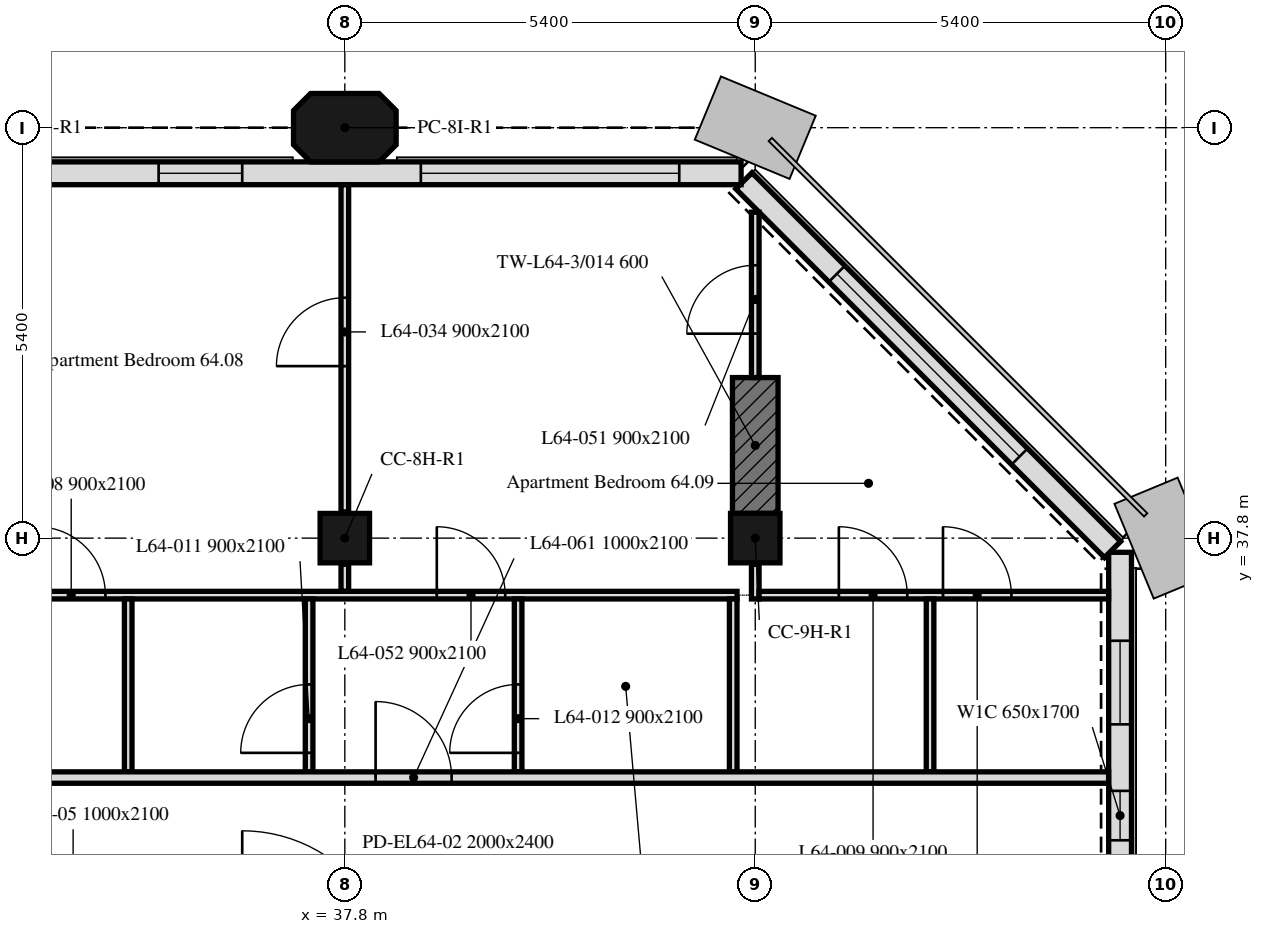
"""IFC4 building model, lengths in metres.
Left out: names, types, materials, properties, quantities, classifications, styles, units other than length and angle.
Written with IfcOpenShell. Run it as: python <this file> out.ifc"""

import sys

from ifc_helpers import new_model, si_unit, direction, frame, frame_2d, origin, origin_2d, place, context, subcontext, project, spatial, polyline, rectangle, outline, extrude, element, fill, save


model = new_model("IFC4")
c1 = context("Model", 3, precision=1e-05, world=origin(), true_north=direction((0.0, 1.0)))
c2 = subcontext(c1, "Body", "Model", "MODEL_VIEW")
j1 = project(units=[si_unit("LENGTHUNIT", "METRE"), si_unit("PLANEANGLEUNIT", "RADIAN")], contexts=[c1])
p1 = place(None, origin())
s1 = spatial("IfcSite", under=j1, at=p1, CompositionType="ELEMENT")
p2 = place(p1, origin())
s2 = spatial("IfcBuilding", under=s1, at=p2, CompositionType="ELEMENT")
p3 = place(p2, frame((0.0, 0.0, 265.3)))
s3 = spatial("IfcBuildingStorey", under=s2, at=p3, CompositionType="ELEMENT", Elevation=265.3)
for number, where, z_axis, x_axis in (
    (1, (37.8, 37.8, 0.0), (0.0, 0.0, 1.0), (1.0, 0.0, 0.0)),
    (2, (43.2, 37.8, 0.0), (0.0, 0.0, 1.0), (1.0, 0.0, 0.0)),
):
    element("IfcColumn", number, at=place(p3, frame(where, z_axis=z_axis, x_axis=x_axis)), inside=s3, PredefinedType="COLUMN", context=c2, shape_type="SweptSolid", body=[
        extrude(rectangle(XDim=0.65, YDim=0.65, at=origin_2d()), origin(), (0.0, 0.0, 1.0), 3.0),
    ])
p4 = place(p3, frame((37.8, 43.2, 0.0), z_axis=(0.0, 0.0, 1.0), x_axis=(1.0, 0.0, 0.0)))
e3 = element("IfcColumn", 3, at=p4, inside=s3, PredefinedType="COLUMN", context=c2, shape_type="SweptSolid", body=[
    extrude(outline(polyline([(-0.45, -0.45), (0.45, -0.45), (0.675, -0.225), (0.675, 0.225), (0.45, 0.45), (-0.45, 0.45), (-0.675, 0.225), (-0.675, -0.225), (-0.45, -0.45)])), origin(), (0.0, 0.0, 1.0), 3.0),
])
p5 = place(p3, frame((43.2, 38.125, 0.0), z_axis=(0.0, 0.0, 1.0), x_axis=(0.0, 1.0, 0.0)))
e4 = element("IfcWall", 4, at=p5, inside=s3, PredefinedType="SHEAR", context=c2, shape_type="SweptSolid", body=[
    extrude(rectangle(XDim=1.788, YDim=0.6, at=frame_2d((0.894, 0.0))), origin(), (0.0, 0.0, 1.0), 3.0),
])
p6 = place(p3, frame((48.0, 5.586, 0.0), z_axis=(0.0, 0.0, 1.0), x_axis=(0.0, 1.0, 0.0)))
e5 = element("IfcWall", 5, at=p6, inside=s3, PredefinedType="SOLIDWALL", context=c2, shape_type="SweptSolid", body=[
    extrude(rectangle(XDim=32.027, YDim=0.3, at=frame_2d((16.014, 0.0))), origin(), (0.0, 0.0, 1.0), 3.0),
])
p7 = place(p6, frame((1.314, 0.0, 0.9)))
e6 = element("IfcOpeningElement", 6, at=p7, cuts=e5, PredefinedType="OPENING", context=c2, shape_type="SweptSolid", body=[
    extrude(rectangle(XDim=1.1, YDim=1.7, at=frame_2d((0.55, 0.85))), frame((0.0, 0.16, 0.0), z_axis=(0.0, -1.0, 0.0), x_axis=(1.0, 0.0, 0.0)), (0.0, 0.0, 1.0), 0.32),
])
p8 = place(p6, frame((2.764, 0.0, 0.9)))
e7 = element("IfcOpeningElement", 7, at=p8, cuts=e5, PredefinedType="OPENING", context=c2, shape_type="SweptSolid", body=[
    extrude(rectangle(XDim=1.1, YDim=1.7, at=frame_2d((0.55, 0.85))), frame((0.0, 0.16, 0.0), z_axis=(0.0, -1.0, 0.0), x_axis=(1.0, 0.0, 0.0)), (0.0, 0.0, 1.0), 0.32),
])
p9 = place(p6, frame((7.664, 0.0, 0.9)))
e8 = element("IfcOpeningElement", 8, at=p9, cuts=e5, PredefinedType="OPENING", context=c2, shape_type="SweptSolid", body=[
    extrude(rectangle(XDim=0.5, YDim=1.7, at=frame_2d((0.25, 0.85))), frame((0.0, 0.16, 0.0), z_axis=(0.0, -1.0, 0.0), x_axis=(1.0, 0.0, 0.0)), (0.0, 0.0, 1.0), 0.32),
])
p10 = place(p6, frame((13.064, 0.0, 0.9)))
e9 = element("IfcOpeningElement", 9, at=p10, cuts=e5, PredefinedType="OPENING", context=c2, shape_type="SweptSolid", body=[
    extrude(rectangle(XDim=0.5, YDim=1.7, at=frame_2d((0.25, 0.85))), frame((0.0, 0.16, 0.0), z_axis=(0.0, -1.0, 0.0), x_axis=(1.0, 0.0, 0.0)), (0.0, 0.0, 1.0), 0.32),
])
p11 = place(p6, frame((18.464, 0.0, 0.9)))
e10 = element("IfcOpeningElement", 10, at=p11, cuts=e5, PredefinedType="OPENING", context=c2, shape_type="SweptSolid", body=[
    extrude(rectangle(XDim=0.5, YDim=1.7, at=frame_2d((0.25, 0.85))), frame((0.0, 0.16, 0.0), z_axis=(0.0, -1.0, 0.0), x_axis=(1.0, 0.0, 0.0)), (0.0, 0.0, 1.0), 0.32),
])
p12 = place(p6, frame((23.864, 0.0, 0.9)))
e11 = element("IfcOpeningElement", 11, at=p12, cuts=e5, PredefinedType="OPENING", context=c2, shape_type="SweptSolid", body=[
    extrude(rectangle(XDim=0.5, YDim=1.7, at=frame_2d((0.25, 0.85))), frame((0.0, 0.16, 0.0), z_axis=(0.0, -1.0, 0.0), x_axis=(1.0, 0.0, 0.0)), (0.0, 0.0, 1.0), 0.32),
])
p13 = place(p6, frame((28.239, 0.0, 0.9)))
e12 = element("IfcOpeningElement", 12, at=p13, cuts=e5, PredefinedType="OPENING", context=c2, shape_type="SweptSolid", body=[
    extrude(rectangle(XDim=0.65, YDim=1.7, at=frame_2d((0.325, 0.85))), frame((0.0, 0.16, 0.0), z_axis=(0.0, -1.0, 0.0), x_axis=(1.0, 0.0, 0.0)), (0.0, 0.0, 1.0), 0.32),
])
p14 = place(p6, frame((29.764, 0.0, 0.9)))
e13 = element("IfcOpeningElement", 13, at=p14, cuts=e5, PredefinedType="OPENING", context=c2, shape_type="SweptSolid", body=[
    extrude(rectangle(XDim=1.1, YDim=1.7, at=frame_2d((0.55, 0.85))), frame((0.0, 0.16, 0.0), z_axis=(0.0, -1.0, 0.0), x_axis=(1.0, 0.0, 0.0)), (0.0, 0.0, 1.0), 0.32),
])
p15 = place(p3, frame((47.901, 37.65, 0.0), z_axis=(0.0, 0.0, 1.0), x_axis=(-0.707106781187, 0.707106781187, 0.0)))
e14 = element("IfcWall", 14, at=p15, inside=s3, PredefinedType="SOLIDWALL", context=c2, shape_type="SweptSolid", body=[
    extrude(rectangle(XDim=6.86, YDim=0.3, at=frame_2d((3.43, 0.0))), origin(), (0.0, 0.0, 1.0), 3.0),
])
p16 = place(p15, frame((1.73, 0.0, 0.9)))
e15 = element("IfcOpeningElement", 15, at=p16, cuts=e14, PredefinedType="OPENING", context=c2, shape_type="SweptSolid", body=[
    extrude(rectangle(XDim=3.4, YDim=1.7, at=frame_2d((1.7, 0.85))), frame((0.0, 0.16, 0.0), z_axis=(0.0, -1.0, 0.0), x_axis=(1.0, 0.0, 0.0)), (0.0, 0.0, 1.0), 0.32),
])
p17 = place(p3, frame((43.014, 42.6, 0.0), z_axis=(0.0, 0.0, 1.0), x_axis=(-1.0, 0.0, 0.0)))
e16 = element("IfcWall", 16, at=p17, inside=s3, PredefinedType="SOLIDWALL", context=c2, shape_type="SweptSolid", body=[
    extrude(rectangle(XDim=32.027, YDim=0.3, at=frame_2d((16.014, 0.0))), origin(), (0.0, 0.0, 1.0), 3.0),
])
p18 = place(p17, frame((0.814, 0.0, 0.9)))
e17 = element("IfcOpeningElement", 17, at=p18, cuts=e16, PredefinedType="OPENING", context=c2, shape_type="SweptSolid", body=[
    extrude(rectangle(XDim=3.4, YDim=1.7, at=frame_2d((1.7, 0.85))), frame((0.0, 0.16, 0.0), z_axis=(0.0, -1.0, 0.0), x_axis=(1.0, 0.0, 0.0)), (0.0, 0.0, 1.0), 0.32),
])
p19 = place(p17, frame((6.564, 0.0, 0.9)))
e18 = element("IfcOpeningElement", 18, at=p19, cuts=e16, PredefinedType="OPENING", context=c2, shape_type="SweptSolid", body=[
    extrude(rectangle(XDim=1.1, YDim=1.7, at=frame_2d((0.55, 0.85))), frame((0.0, 0.16, 0.0), z_axis=(0.0, -1.0, 0.0), x_axis=(1.0, 0.0, 0.0)), (0.0, 0.0, 1.0), 0.32),
])
p20 = place(p17, frame((11.614, 0.0, 0.9)))
e19 = element("IfcOpeningElement", 19, at=p20, cuts=e16, PredefinedType="OPENING", context=c2, shape_type="SweptSolid", body=[
    extrude(rectangle(XDim=3.4, YDim=1.7, at=frame_2d((1.7, 0.85))), frame((0.0, 0.16, 0.0), z_axis=(0.0, -1.0, 0.0), x_axis=(1.0, 0.0, 0.0)), (0.0, 0.0, 1.0), 0.32),
])
p21 = place(p17, frame((17.364, 0.0, 0.9)))
e20 = element("IfcOpeningElement", 20, at=p21, cuts=e16, PredefinedType="OPENING", context=c2, shape_type="SweptSolid", body=[
    extrude(rectangle(XDim=1.1, YDim=1.7, at=frame_2d((0.55, 0.85))), frame((0.0, 0.16, 0.0), z_axis=(0.0, -1.0, 0.0), x_axis=(1.0, 0.0, 0.0)), (0.0, 0.0, 1.0), 0.32),
])
p22 = place(p17, frame((22.414, 0.0, 0.9)))
e21 = element("IfcOpeningElement", 21, at=p22, cuts=e16, PredefinedType="OPENING", context=c2, shape_type="SweptSolid", body=[
    extrude(rectangle(XDim=3.4, YDim=1.7, at=frame_2d((1.7, 0.85))), frame((0.0, 0.16, 0.0), z_axis=(0.0, -1.0, 0.0), x_axis=(1.0, 0.0, 0.0)), (0.0, 0.0, 1.0), 0.32),
])
p23 = place(p17, frame((28.164, 0.0, 0.9)))
e22 = element("IfcOpeningElement", 22, at=p23, cuts=e16, PredefinedType="OPENING", context=c2, shape_type="SweptSolid", body=[
    extrude(rectangle(XDim=1.1, YDim=1.7, at=frame_2d((0.55, 0.85))), frame((0.0, 0.16, 0.0), z_axis=(0.0, -1.0, 0.0), x_axis=(1.0, 0.0, 0.0)), (0.0, 0.0, 1.0), 0.32),
])
p24 = place(p3, frame((37.8, 37.1, 0.0), z_axis=(0.0, 0.0, 1.0), x_axis=(0.0, 1.0, 0.0)))
e23 = element("IfcWall", 23, at=p24, inside=s3, PredefinedType="PARTITIONING", context=c2, shape_type="SweptSolid", body=[
    extrude(rectangle(XDim=0.355, YDim=0.1, at=frame_2d((0.177, 0.0))), origin(), (0.0, 0.0, 1.0), 3.0),
])
p25 = place(p3, frame((37.8, 38.145, 0.0), z_axis=(0.0, 0.0, 1.0), x_axis=(0.0, 1.0, 0.0)))
e24 = element("IfcWall", 24, at=p25, inside=s3, PredefinedType="PARTITIONING", context=c2, shape_type="SweptSolid", body=[
    extrude(rectangle(XDim=4.304, YDim=0.1, at=frame_2d((2.152, 0.0))), origin(), (0.0, 0.0, 1.0), 3.0),
])
p26 = place(p25, frame((1.918, 0.0, 0.0)))
e25 = element("IfcOpeningElement", 25, at=p26, cuts=e24, PredefinedType="OPENING", context=c2, shape_type="SweptSolid", body=[
    extrude(rectangle(XDim=0.9, YDim=2.1, at=frame_2d((0.45, 1.05))), frame((0.0, 0.05, 0.0), z_axis=(0.0, -1.0, 0.0), x_axis=(1.0, 0.0, 0.0)), (0.0, 0.0, 1.0), 0.1),
])
p27 = place(p3, frame((32.475, 37.05, 0.0), z_axis=(0.0, 0.0, 1.0), x_axis=(1.0, 0.0, 0.0)))
e26 = element("IfcWall", 26, at=p27, inside=s3, PredefinedType="PARTITIONING", context=c2, shape_type="SweptSolid", body=[
    extrude(rectangle(XDim=10.485, YDim=0.1, at=frame_2d((5.242, 0.0))), origin(), (0.0, 0.0, 1.0), 3.0),
])
p28 = place(p27, frame((1.275, 0.0, 0.0)))
e27 = element("IfcOpeningElement", 27, at=p28, cuts=e26, PredefinedType="OPENING", context=c2, shape_type="SweptSolid", body=[
    extrude(rectangle(XDim=0.9, YDim=2.1, at=frame_2d((0.45, 1.05))), frame((0.0, 0.05, 0.0), z_axis=(0.0, -1.0, 0.0), x_axis=(1.0, 0.0, 0.0)), (0.0, 0.0, 1.0), 0.1),
])
p29 = place(p27, frame((6.535, 0.0, 0.0)))
e28 = element("IfcOpeningElement", 28, at=p29, cuts=e26, PredefinedType="OPENING", context=c2, shape_type="SweptSolid", body=[
    extrude(rectangle(XDim=0.9, YDim=2.1, at=frame_2d((0.45, 1.05))), frame((0.0, 0.05, 0.0), z_axis=(0.0, -1.0, 0.0), x_axis=(1.0, 0.0, 0.0)), (0.0, 0.0, 1.0), 0.1),
])
p30 = place(p3, frame((43.2, 37.0, 0.0), z_axis=(0.0, 0.0, 1.0), x_axis=(0.0, 1.0, 0.0)))
e29 = element("IfcWall", 29, at=p30, inside=s3, PredefinedType="PARTITIONING", context=c2, shape_type="SweptSolid", body=[
    extrude(rectangle(XDim=0.455, YDim=0.1, at=frame_2d((0.228, 0.0))), origin(), (0.0, 0.0, 1.0), 3.0),
])
p31 = place(p3, frame((43.2, 39.913, 0.0), z_axis=(0.0, 0.0, 1.0), x_axis=(0.0, 1.0, 0.0)))
e30 = element("IfcWall", 30, at=p31, inside=s3, PredefinedType="PARTITIONING", context=c2, shape_type="SweptSolid", body=[
    extrude(rectangle(XDim=2.175, YDim=0.1, at=frame_2d((1.088, 0.0))), origin(), (0.0, 0.0, 1.0), 3.0),
])
p32 = place(p31, frame((0.577, 0.0, 0.0)))
e31 = element("IfcOpeningElement", 31, at=p32, cuts=e30, PredefinedType="OPENING", context=c2, shape_type="SweptSolid", body=[
    extrude(rectangle(XDim=0.9, YDim=2.1, at=frame_2d((0.45, 1.05))), frame((0.0, 0.05, 0.0), z_axis=(0.0, -1.0, 0.0), x_axis=(1.0, 0.0, 0.0)), (0.0, 0.0, 1.0), 0.1),
])
p33 = place(p3, frame((43.25, 37.05, 0.0), z_axis=(0.0, 0.0, 1.0), x_axis=(1.0, 0.0, 0.0)))
e32 = element("IfcWall", 32, at=p33, inside=s3, PredefinedType="PARTITIONING", context=c2, shape_type="SweptSolid", body=[
    extrude(rectangle(XDim=4.599, YDim=0.1, at=frame_2d((2.3, 0.0))), origin(), (0.0, 0.0, 1.0), 3.0),
])
p34 = place(p33, frame((1.05, 0.0, 0.0)))
e33 = element("IfcOpeningElement", 33, at=p34, cuts=e32, PredefinedType="OPENING", context=c2, shape_type="SweptSolid", body=[
    extrude(rectangle(XDim=0.9, YDim=2.1, at=frame_2d((0.45, 1.05))), frame((0.0, 0.05, 0.0), z_axis=(0.0, -1.0, 0.0), x_axis=(1.0, 0.0, 0.0)), (0.0, 0.0, 1.0), 0.1),
])
p35 = place(p33, frame((2.42, 0.0, 0.0)))
e34 = element("IfcOpeningElement", 34, at=p35, cuts=e32, PredefinedType="OPENING", context=c2, shape_type="SweptSolid", body=[
    extrude(rectangle(XDim=0.9, YDim=2.1, at=frame_2d((0.45, 1.05))), frame((0.0, 0.05, 0.0), z_axis=(0.0, -1.0, 0.0), x_axis=(1.0, 0.0, 0.0)), (0.0, 0.0, 1.0), 0.1),
])
p36 = place(p3, frame((34.95, 34.725, 0.0), z_axis=(0.0, 0.0, 1.0), x_axis=(0.0, 1.0, 0.0)))
e35 = element("IfcWall", 35, at=p36, inside=s3, PredefinedType="PARTITIONING", context=c2, shape_type="SweptSolid", body=[
    extrude(rectangle(XDim=2.275, YDim=0.1, at=frame_2d((1.137, 0.0))), origin(), (0.0, 0.0, 1.0), 3.0),
])
p37 = place(p3, frame((37.33, 34.725, 0.0), z_axis=(0.0, 0.0, 1.0), x_axis=(0.0, 1.0, 0.0)))
e36 = element("IfcWall", 36, at=p37, inside=s3, PredefinedType="PARTITIONING", context=c2, shape_type="SweptSolid", body=[
    extrude(rectangle(XDim=2.275, YDim=0.1, at=frame_2d((1.137, 0.0))), origin(), (0.0, 0.0, 1.0), 3.0),
])
p38 = place(p37, frame((0.25, 0.0, 0.0)))
e37 = element("IfcOpeningElement", 37, at=p38, cuts=e36, PredefinedType="OPENING", context=c2, shape_type="SweptSolid", body=[
    extrude(rectangle(XDim=0.9, YDim=2.1, at=frame_2d((0.45, 1.05))), frame((0.0, 0.05, 0.0), z_axis=(0.0, -1.0, 0.0), x_axis=(1.0, 0.0, 0.0)), (0.0, 0.0, 1.0), 0.1),
])
p39 = place(p3, frame((40.08, 34.725, 0.0), z_axis=(0.0, 0.0, 1.0), x_axis=(0.0, 1.0, 0.0)))
e38 = element("IfcWall", 38, at=p39, inside=s3, PredefinedType="PARTITIONING", context=c2, shape_type="SweptSolid", body=[
    extrude(rectangle(XDim=2.275, YDim=0.1, at=frame_2d((1.137, 0.0))), origin(), (0.0, 0.0, 1.0), 3.0),
])
p40 = place(p39, frame((0.25, 0.0, 0.0)))
e39 = element("IfcOpeningElement", 39, at=p40, cuts=e38, PredefinedType="OPENING", context=c2, shape_type="SweptSolid", body=[
    extrude(rectangle(XDim=0.9, YDim=2.1, at=frame_2d((0.45, 1.05))), frame((0.0, 0.05, 0.0), z_axis=(0.0, -1.0, 0.0), x_axis=(1.0, 0.0, 0.0)), (0.0, 0.0, 1.0), 0.1),
])
for number, where, z_axis, x_axis in (
    (40, (42.91, 34.725, 0.0), (0.0, 0.0, 1.0), (0.0, 1.0, 0.0)),
    (41, (45.5, 34.725, 0.0), (0.0, 0.0, 1.0), (0.0, 1.0, 0.0)),
):
    element("IfcWall", number, at=place(p3, frame(where, z_axis=z_axis, x_axis=x_axis)), inside=s3, PredefinedType="PARTITIONING", context=c2, shape_type="SweptSolid", body=[
        extrude(rectangle(XDim=2.275, YDim=0.1, at=frame_2d((1.137, 0.0))), origin(), (0.0, 0.0, 1.0), 3.0),
    ])
p41 = place(p3, frame((6.151, 34.65, 0.0), z_axis=(0.0, 0.0, 1.0), x_axis=(1.0, 0.0, 0.0)))
e42 = element("IfcWall", 42, at=p41, inside=s3, PredefinedType="PARTITIONING", context=c2, shape_type="SweptSolid", body=[
    extrude(rectangle(XDim=41.698, YDim=0.15, at=frame_2d((20.849, 0.0))), origin(), (0.0, 0.0, 1.0), 3.0),
])
p42 = place(p41, frame((2.969, 0.0, 0.0)))
e43 = element("IfcOpeningElement", 43, at=p42, cuts=e42, PredefinedType="OPENING", context=c2, shape_type="SweptSolid", body=[
    extrude(rectangle(XDim=1.0, YDim=2.1, at=frame_2d((0.5, 1.05))), frame((0.0, 0.075, 0.0), z_axis=(0.0, -1.0, 0.0), x_axis=(1.0, 0.0, 0.0)), (0.0, 0.0, 1.0), 0.15),
])
p43 = place(p41, frame((15.668, 0.0, 0.0)))
e44 = element("IfcOpeningElement", 44, at=p43, cuts=e42, PredefinedType="OPENING", context=c2, shape_type="SweptSolid", body=[
    extrude(rectangle(XDim=1.0, YDim=2.1, at=frame_2d((0.5, 1.05))), frame((0.0, 0.075, 0.0), z_axis=(0.0, -1.0, 0.0), x_axis=(1.0, 0.0, 0.0)), (0.0, 0.0, 1.0), 0.15),
])
p44 = place(p41, frame((32.054, 0.0, 0.0)))
e45 = element("IfcOpeningElement", 45, at=p44, cuts=e42, PredefinedType="OPENING", context=c2, shape_type="SweptSolid", body=[
    extrude(rectangle(XDim=1.0, YDim=2.1, at=frame_2d((0.5, 1.05))), frame((0.0, 0.075, 0.0), z_axis=(0.0, -1.0, 0.0), x_axis=(1.0, 0.0, 0.0)), (0.0, 0.0, 1.0), 0.15),
])
p45 = place(p13, origin())
e46 = element("IfcWindow", 46, at=p45, inside=s3, PartitioningType="SINGLE_PANEL", PredefinedType="WINDOW", context=c2, shape_type="SweptSolid", body=[
    extrude(rectangle(XDim=0.65, YDim=1.7, at=frame_2d((0.325, 0.85))), frame((0.0, 0.03, 0.0), z_axis=(0.0, -1.0, 0.0), x_axis=(1.0, 0.0, 0.0)), (0.0, 0.0, 1.0), 0.06),
])
fill(e12, e46)
p46 = place(p14, origin())
e47 = element("IfcWindow", 47, at=p46, inside=s3, PartitioningType="SINGLE_PANEL", PredefinedType="WINDOW", context=c2, shape_type="SweptSolid", body=[
    extrude(rectangle(XDim=1.1, YDim=1.7, at=frame_2d((0.55, 0.85))), frame((0.0, 0.03, 0.0), z_axis=(0.0, -1.0, 0.0), x_axis=(1.0, 0.0, 0.0)), (0.0, 0.0, 1.0), 0.06),
])
fill(e13, e47)
p47 = place(p16, origin())
e48 = element("IfcWindow", 48, at=p47, inside=s3, PartitioningType="SINGLE_PANEL", PredefinedType="WINDOW", context=c2, shape_type="SweptSolid", body=[
    extrude(rectangle(XDim=3.4, YDim=1.7, at=frame_2d((1.7, 0.85))), frame((0.0, 0.03, 0.0), z_axis=(0.0, -1.0, 0.0), x_axis=(1.0, 0.0, 0.0)), (0.0, 0.0, 1.0), 0.06),
])
fill(e15, e48)
p48 = place(p18, origin())
e49 = element("IfcWindow", 49, at=p48, inside=s3, PartitioningType="SINGLE_PANEL", PredefinedType="WINDOW", context=c2, shape_type="SweptSolid", body=[
    extrude(rectangle(XDim=3.4, YDim=1.7, at=frame_2d((1.7, 0.85))), frame((0.0, 0.03, 0.0), z_axis=(0.0, -1.0, 0.0), x_axis=(1.0, 0.0, 0.0)), (0.0, 0.0, 1.0), 0.06),
])
fill(e17, e49)
p49 = place(p19, origin())
e50 = element("IfcWindow", 50, at=p49, inside=s3, PartitioningType="SINGLE_PANEL", PredefinedType="WINDOW", context=c2, shape_type="SweptSolid", body=[
    extrude(rectangle(XDim=1.1, YDim=1.7, at=frame_2d((0.55, 0.85))), frame((0.0, 0.03, 0.0), z_axis=(0.0, -1.0, 0.0), x_axis=(1.0, 0.0, 0.0)), (0.0, 0.0, 1.0), 0.06),
])
fill(e18, e50)
p50 = place(p28, origin())
e51 = element("IfcDoor", 51, at=p50, inside=s3, OperationType="SINGLE_SWING_RIGHT", PredefinedType="DOOR", context=c2, shape_type="SweptSolid", body=[
    extrude(rectangle(XDim=0.9, YDim=2.1, at=frame_2d((0.45, 1.05))), frame((0.0, 0.025, 0.0), z_axis=(0.0, -1.0, 0.0), x_axis=(1.0, 0.0, 0.0)), (0.0, 0.0, 1.0), 0.05),
])
fill(e27, e51)
p51 = place(p34, origin())
e52 = element("IfcDoor", 52, at=p51, inside=s3, OperationType="SINGLE_SWING_LEFT", PredefinedType="DOOR", context=c2, shape_type="SweptSolid", body=[
    extrude(rectangle(XDim=0.9, YDim=2.1, at=frame_2d((0.45, 1.05))), frame((0.0, 0.025, 0.0), z_axis=(0.0, -1.0, 0.0), x_axis=(1.0, 0.0, 0.0)), (0.0, 0.0, 1.0), 0.05),
])
fill(e33, e52)
p52 = place(p35, origin())
e53 = element("IfcDoor", 53, at=p52, inside=s3, OperationType="SINGLE_SWING_RIGHT", PredefinedType="DOOR", context=c2, shape_type="SweptSolid", body=[
    extrude(rectangle(XDim=0.9, YDim=2.1, at=frame_2d((0.45, 1.05))), frame((0.0, 0.025, 0.0), z_axis=(0.0, -1.0, 0.0), x_axis=(1.0, 0.0, 0.0)), (0.0, 0.0, 1.0), 0.05),
])
fill(e34, e53)
p53 = place(p38, origin())
e54 = element("IfcDoor", 54, at=p53, inside=s3, OperationType="SINGLE_SWING_LEFT", PredefinedType="DOOR", context=c2, shape_type="SweptSolid", body=[
    extrude(rectangle(XDim=0.9, YDim=2.1, at=frame_2d((0.45, 1.05))), frame((0.0, 0.025, 0.0), z_axis=(0.0, -1.0, 0.0), x_axis=(1.0, 0.0, 0.0)), (0.0, 0.0, 1.0), 0.05),
])
fill(e37, e54)
p54 = place(p40, origin())
e55 = element("IfcDoor", 55, at=p54, inside=s3, OperationType="SINGLE_SWING_RIGHT", PredefinedType="DOOR", context=c2, shape_type="SweptSolid", body=[
    extrude(rectangle(XDim=0.9, YDim=2.1, at=frame_2d((0.45, 1.05))), frame((0.0, 0.025, 0.0), z_axis=(0.0, -1.0, 0.0), x_axis=(1.0, 0.0, 0.0)), (0.0, 0.0, 1.0), 0.05),
])
fill(e39, e55)
p55 = place(p26, origin())
e56 = element("IfcDoor", 56, at=p55, inside=s3, OperationType="SINGLE_SWING_RIGHT", PredefinedType="DOOR", context=c2, shape_type="SweptSolid", body=[
    extrude(rectangle(XDim=0.9, YDim=2.1, at=frame_2d((0.45, 1.05))), frame((0.0, 0.025, 0.0), z_axis=(0.0, -1.0, 0.0), x_axis=(1.0, 0.0, 0.0)), (0.0, 0.0, 1.0), 0.05),
])
fill(e25, e56)
p56 = place(p32, origin())
e57 = element("IfcDoor", 57, at=p56, inside=s3, OperationType="SINGLE_SWING_LEFT", PredefinedType="DOOR", context=c2, shape_type="SweptSolid", body=[
    extrude(rectangle(XDim=0.9, YDim=2.1, at=frame_2d((0.45, 1.05))), frame((0.0, 0.025, 0.0), z_axis=(0.0, -1.0, 0.0), x_axis=(1.0, 0.0, 0.0)), (0.0, 0.0, 1.0), 0.05),
])
fill(e31, e57)
p57 = place(p29, origin())
e58 = element("IfcDoor", 58, at=p57, inside=s3, OperationType="SINGLE_SWING_RIGHT", PredefinedType="DOOR", context=c2, shape_type="SweptSolid", body=[
    extrude(rectangle(XDim=0.9, YDim=2.1, at=frame_2d((0.45, 1.05))), frame((0.0, 0.025, 0.0), z_axis=(0.0, -1.0, 0.0), x_axis=(1.0, 0.0, 0.0)), (0.0, 0.0, 1.0), 0.05),
])
fill(e28, e58)
p58 = place(p44, origin())
e59 = element("IfcDoor", 59, at=p58, inside=s3, OperationType="SINGLE_SWING_RIGHT", PredefinedType="DOOR", context=c2, shape_type="SweptSolid", body=[
    extrude(rectangle(XDim=1.0, YDim=2.1, at=frame_2d((0.5, 1.05))), frame((0.0, 0.025, 0.0), z_axis=(0.0, -1.0, 0.0), x_axis=(1.0, 0.0, 0.0)), (0.0, 0.0, 1.0), 0.05),
])
fill(e45, e59)
save(model, sys.argv[1])
